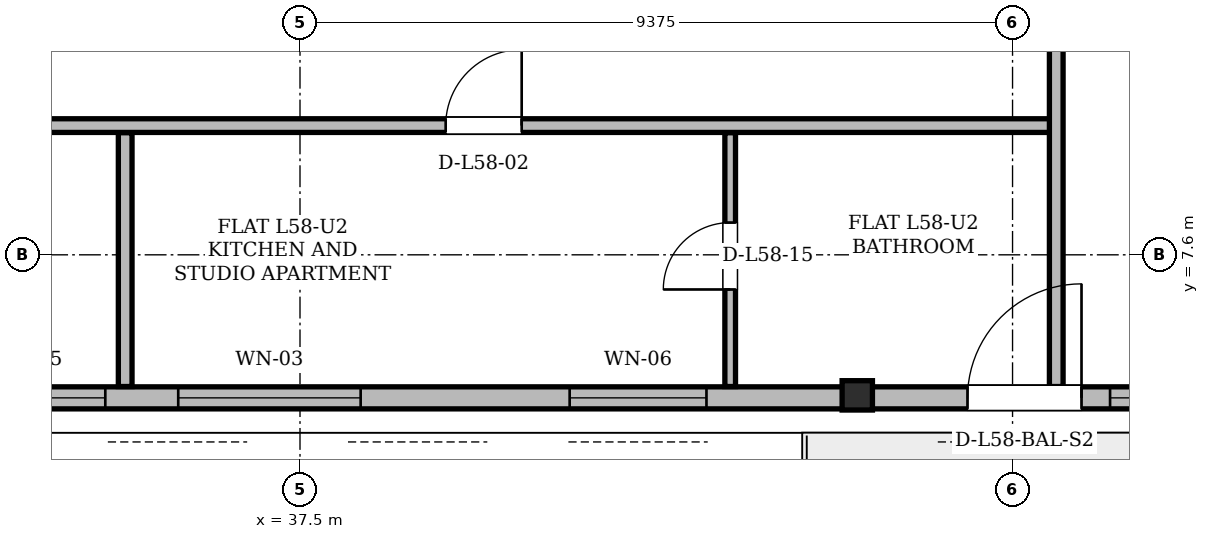
"""IFC4 building model, lengths in metres.
Left out: names, types, materials, properties, quantities, classifications, styles, units other than length and angle.
Written with IfcOpenShell. Run it as: python <this file> out.ifc"""

import sys

from ifc_helpers import new_model, si_unit, direction, frame, frame_2d, origin, origin_2d, place, context, subcontext, project, spatial, rectangle, i_section, extrude, element, fill, save


model = new_model("IFC4")
c1 = context("Model", 3, precision=1e-05, world=origin(), true_north=direction((0.0, 1.0)))
c2 = subcontext(c1, "Body", "Model", "MODEL_VIEW")
j1 = project(units=[si_unit("LENGTHUNIT", "METRE"), si_unit("PLANEANGLEUNIT", "RADIAN")], contexts=[c1])
p1 = place(None, origin())
s1 = spatial("IfcSite", under=j1, at=p1, CompositionType="ELEMENT")
p2 = place(p1, origin())
s2 = spatial("IfcBuilding", under=s1, at=p2, CompositionType="ELEMENT")
p3 = place(p2, frame((0.0, 0.0, 219.9)))
s3 = spatial("IfcBuildingStorey", under=s2, at=p3, CompositionType="ELEMENT", Elevation=219.9)
p4 = place(p3, frame((44.827, 5.718, 0.005), z_axis=(0.003058821819, 0.018352930912, 0.999826891785), x_axis=(-0.986393923832, 0.164398987305, 0.0)))
e1 = element("IfcColumn", 1, at=p4, inside=s3, PredefinedType="COLUMN", context=c2, shape_type="SweptSolid", body=[
    extrude(i_section(OverallWidth=0.399, OverallDepth=0.386, WebThickness=0.021, FlangeThickness=0.033, at=origin_2d()), origin(), (0.0, 0.0, 1.0), 3.592),
])
p5 = place(p3, frame((19.183, 5.718, 0.0), z_axis=(0.0, 0.0, 1.0), x_axis=(1.0, 0.0, 0.0)))
e2 = element("IfcWall", 2, at=p5, inside=s3, PredefinedType="SOLIDWALL", context=c2, shape_type="SweptSolid", body=[
    extrude(rectangle(XDim=36.634, YDim=0.29, at=frame_2d((18.317, 0.0))), origin(), (0.0, 0.0, 1.0), 2.677),
])
p6 = place(p5, frame((3.639, 0.0, 0.0)))
e3 = element("IfcOpeningElement", 3, at=p6, cuts=e2, PredefinedType="OPENING", context=c2, shape_type="SweptSolid", body=[
    extrude(rectangle(XDim=1.5, YDim=2.2, at=frame_2d((0.75, 1.1))), frame((0.0, 0.145, 0.0), z_axis=(0.0, -1.0, 0.0), x_axis=(1.0, 0.0, 0.0)), (0.0, 0.0, 1.0), 0.29),
])
p7 = place(p5, frame((27.099, 0.0, 0.0)))
e4 = element("IfcOpeningElement", 4, at=p7, cuts=e2, PredefinedType="OPENING", context=c2, shape_type="SweptSolid", body=[
    extrude(rectangle(XDim=1.5, YDim=2.2, at=frame_2d((0.75, 1.1))), frame((0.0, 0.145, 0.0), z_axis=(0.0, -1.0, 0.0), x_axis=(1.0, 0.0, 0.0)), (0.0, 0.0, 1.0), 0.29),
])
p8 = place(p5, frame((1.334, 0.0, 0.85)))
e5 = element("IfcOpeningElement", 5, at=p8, cuts=e2, PredefinedType="OPENING", context=c2, shape_type="SweptSolid", body=[
    extrude(rectangle(XDim=1.2, YDim=1.48, at=frame_2d((0.6, 0.74))), frame((0.0, 0.145, 0.0), z_axis=(0.0, -1.0, 0.0), x_axis=(1.0, 0.0, 0.0)), (0.0, 0.0, 1.0), 0.29),
])
p9 = place(p5, frame((7.323, 0.0, 0.85)))
e6 = element("IfcOpeningElement", 6, at=p9, cuts=e2, PredefinedType="OPENING", context=c2, shape_type="SweptSolid", body=[
    extrude(rectangle(XDim=2.2, YDim=1.717, at=frame_2d((1.1, 0.858))), frame((0.0, 0.145, 0.0), z_axis=(0.0, -1.0, 0.0), x_axis=(1.0, 0.0, 0.0)), (0.0, 0.0, 1.0), 0.29),
])
p10 = place(p5, frame((13.755, 0.0, 0.85)))
e7 = element("IfcOpeningElement", 7, at=p10, cuts=e2, PredefinedType="OPENING", context=c2, shape_type="SweptSolid", body=[
    extrude(rectangle(XDim=2.0, YDim=1.717, at=frame_2d((1.0, 0.858))), frame((0.0, 0.145, 0.0), z_axis=(0.0, -1.0, 0.0), x_axis=(1.0, 0.0, 0.0)), (0.0, 0.0, 1.0), 0.29),
])
p11 = place(p5, frame((16.715, 0.0, 0.85)))
e8 = element("IfcOpeningElement", 8, at=p11, cuts=e2, PredefinedType="OPENING", context=c2, shape_type="SweptSolid", body=[
    extrude(rectangle(XDim=2.4, YDim=1.717, at=frame_2d((1.2, 0.858))), frame((0.0, 0.145, 0.0), z_axis=(0.0, -1.0, 0.0), x_axis=(1.0, 0.0, 0.0)), (0.0, 0.0, 1.0), 0.29),
])
p12 = place(p5, frame((21.865, 0.0, 0.85)))
e9 = element("IfcOpeningElement", 9, at=p12, cuts=e2, PredefinedType="OPENING", context=c2, shape_type="SweptSolid", body=[
    extrude(rectangle(XDim=1.8, YDim=1.717, at=frame_2d((0.9, 0.858))), frame((0.0, 0.145, 0.0), z_axis=(0.0, -1.0, 0.0), x_axis=(1.0, 0.0, 0.0)), (0.0, 0.0, 1.0), 0.29),
])
p13 = place(p5, frame((28.975, 0.0, 0.85)))
e10 = element("IfcOpeningElement", 10, at=p13, cuts=e2, PredefinedType="OPENING", context=c2, shape_type="SweptSolid", body=[
    extrude(rectangle(XDim=1.2, YDim=1.48, at=frame_2d((0.6, 0.74))), frame((0.0, 0.145, 0.0), z_axis=(0.0, -1.0, 0.0), x_axis=(1.0, 0.0, 0.0)), (0.0, 0.0, 1.0), 0.29),
])
p14 = place(p5, frame((31.861, 0.0, 0.85)))
e11 = element("IfcOpeningElement", 11, at=p14, cuts=e2, PredefinedType="OPENING", context=c2, shape_type="SweptSolid", body=[
    extrude(rectangle(XDim=2.6, YDim=1.717, at=frame_2d((1.3, 0.858))), frame((0.0, 0.145, 0.0), z_axis=(0.0, -1.0, 0.0), x_axis=(1.0, 0.0, 0.0)), (0.0, 0.0, 1.0), 0.29),
])
p15 = place(p3, frame((25.6, 9.3, 0.0), z_axis=(0.0, 0.0, 1.0), x_axis=(1.0, 0.0, 0.0)))
e12 = element("IfcWall", 12, at=p15, inside=s3, PredefinedType="PARTITIONING", context=c2, shape_type="SweptSolid", body=[
    extrude(rectangle(XDim=21.85, YDim=0.18, at=frame_2d((10.925, 0.0))), origin(), (0.0, 0.0, 1.0), 2.913),
])
p16 = place(p15, frame((2.193, 0.0, 0.0)))
e13 = element("IfcOpeningElement", 13, at=p16, cuts=e12, PredefinedType="OPENING", context=c2, shape_type="SweptSolid", body=[
    extrude(rectangle(XDim=1.0, YDim=2.18, at=frame_2d((0.5, 1.09))), frame((0.0, 0.09, 0.0), z_axis=(0.0, -1.0, 0.0), x_axis=(1.0, 0.0, 0.0)), (0.0, 0.0, 1.0), 0.18),
])
p17 = place(p15, frame((13.817, 0.0, 0.0)))
e14 = element("IfcOpeningElement", 14, at=p17, cuts=e12, PredefinedType="OPENING", context=c2, shape_type="SweptSolid", body=[
    extrude(rectangle(XDim=1.0, YDim=2.18, at=frame_2d((0.5, 1.09))), frame((0.0, 0.09, 0.0), z_axis=(0.0, -1.0, 0.0), x_axis=(1.0, 0.0, 0.0)), (0.0, 0.0, 1.0), 0.18),
])
p18 = place(p3, frame((35.2, 5.867, 0.0), z_axis=(0.0, 0.0, 1.0), x_axis=(0.0, 1.0, 0.0)))
e15 = element("IfcWall", 15, at=p18, inside=s3, PredefinedType="PARTITIONING", context=c2, shape_type="SweptSolid", body=[
    extrude(rectangle(XDim=3.339, YDim=0.18, at=frame_2d((1.669, 0.0))), origin(), (0.0, 0.0, 1.0), 3.38),
])
p19 = place(p3, frame((43.16, 5.867, 0.0), z_axis=(0.0, 0.0, 1.0), x_axis=(0.0, 1.0, 0.0)))
e16 = element("IfcWall", 16, at=p19, inside=s3, PredefinedType="PARTITIONING", context=c2, shape_type="SweptSolid", body=[
    extrude(rectangle(XDim=3.339, YDim=0.14, at=frame_2d((1.669, 0.0))), origin(), (0.0, 0.0, 1.0), 3.38),
])
p20 = place(p19, frame((1.277, 0.0, 0.0)))
e17 = element("IfcOpeningElement", 17, at=p20, cuts=e16, PredefinedType="OPENING", context=c2, shape_type="SweptSolid", body=[
    extrude(rectangle(XDim=0.88, YDim=2.08, at=frame_2d((0.44, 1.04))), frame((0.0, 0.07, 0.0), z_axis=(0.0, -1.0, 0.0), x_axis=(1.0, 0.0, 0.0)), (0.0, 0.0, 1.0), 0.14),
])
p21 = place(p3, frame((47.45, 5.867, 0.0), z_axis=(0.0, 0.0, 1.0), x_axis=(0.0, 1.0, 0.0)))
e18 = element("IfcWall", 18, at=p21, inside=s3, PredefinedType="PARTITIONING", context=c2, shape_type="SweptSolid", body=[
    extrude(rectangle(XDim=25.465, YDim=0.18, at=frame_2d((12.732, 0.0))), origin(), (0.0, 0.0, 1.0), 2.913),
])
p22 = place(p21, frame((9.055, 0.0, 0.0)))
e19 = element("IfcOpeningElement", 19, at=p22, cuts=e18, PredefinedType="OPENING", context=c2, shape_type="SweptSolid", body=[
    extrude(rectangle(XDim=1.0, YDim=2.18, at=frame_2d((0.5, 1.09))), frame((0.0, 0.09, 0.0), z_axis=(0.0, -1.0, 0.0), x_axis=(1.0, 0.0, 0.0)), (0.0, 0.0, 1.0), 0.18),
])
p23 = place(p21, frame((15.845, 0.0, 0.0)))
e20 = element("IfcOpeningElement", 20, at=p23, cuts=e18, PredefinedType="OPENING", context=c2, shape_type="SweptSolid", body=[
    extrude(rectangle(XDim=1.0, YDim=2.18, at=frame_2d((0.5, 1.09))), frame((0.0, 0.09, 0.0), z_axis=(0.0, -1.0, 0.0), x_axis=(1.0, 0.0, 0.0)), (0.0, 0.0, 1.0), 0.18),
])
p24 = place(p7, origin())
e21 = element("IfcDoor", 21, at=p24, inside=s3, OperationType="SINGLE_SWING_RIGHT", PredefinedType="DOOR", context=c2, shape_type="SweptSolid", body=[
    extrude(rectangle(XDim=1.5, YDim=2.2, at=frame_2d((0.75, 1.1))), frame((0.0, 0.025, 0.0), z_axis=(0.0, -1.0, 0.0), x_axis=(1.0, 0.0, 0.0)), (0.0, 0.0, 1.0), 0.05),
])
fill(e4, e21)
p25 = place(p10, origin())
e22 = element("IfcWindow", 22, at=p25, inside=s3, PartitioningType="SINGLE_PANEL", PredefinedType="WINDOW", context=c2, shape_type="SweptSolid", body=[
    extrude(rectangle(XDim=2.0, YDim=1.717, at=frame_2d((1.0, 0.858))), frame((0.0, 0.03, 0.0), z_axis=(0.0, -1.0, 0.0), x_axis=(1.0, 0.0, 0.0)), (0.0, 0.0, 1.0), 0.06),
])
fill(e7, e22)
p26 = place(p11, origin())
e23 = element("IfcWindow", 23, at=p26, inside=s3, PartitioningType="SINGLE_PANEL", PredefinedType="WINDOW", context=c2, shape_type="SweptSolid", body=[
    extrude(rectangle(XDim=2.4, YDim=1.717, at=frame_2d((1.2, 0.858))), frame((0.0, 0.03, 0.0), z_axis=(0.0, -1.0, 0.0), x_axis=(1.0, 0.0, 0.0)), (0.0, 0.0, 1.0), 0.06),
])
fill(e8, e23)
p27 = place(p12, origin())
e24 = element("IfcWindow", 24, at=p27, inside=s3, PartitioningType="SINGLE_PANEL", PredefinedType="WINDOW", context=c2, shape_type="SweptSolid", body=[
    extrude(rectangle(XDim=1.8, YDim=1.717, at=frame_2d((0.9, 0.858))), frame((0.0, 0.03, 0.0), z_axis=(0.0, -1.0, 0.0), x_axis=(1.0, 0.0, 0.0)), (0.0, 0.0, 1.0), 0.06),
])
fill(e9, e24)
p28 = place(p13, origin())
e25 = element("IfcWindow", 25, at=p28, inside=s3, PartitioningType="SINGLE_PANEL", PredefinedType="WINDOW", context=c2, shape_type="SweptSolid", body=[
    extrude(rectangle(XDim=1.2, YDim=1.48, at=frame_2d((0.6, 0.74))), frame((0.0, 0.03, 0.0), z_axis=(0.0, -1.0, 0.0), x_axis=(1.0, 0.0, 0.0)), (0.0, 0.0, 1.0), 0.06),
])
fill(e10, e25)
p29 = place(p17, origin())
e26 = element("IfcDoor", 26, at=p29, inside=s3, OperationType="SINGLE_SWING_RIGHT", PredefinedType="DOOR", context=c2, shape_type="SweptSolid", body=[
    extrude(rectangle(XDim=1.0, YDim=2.18, at=frame_2d((0.5, 1.09))), frame((0.0, 0.025, 0.0), z_axis=(0.0, -1.0, 0.0), x_axis=(1.0, 0.0, 0.0)), (0.0, 0.0, 1.0), 0.05),
])
fill(e14, e26)
p30 = place(p20, origin())
e27 = element("IfcDoor", 27, at=p30, inside=s3, OperationType="SINGLE_SWING_LEFT", PredefinedType="DOOR", context=c2, shape_type="SweptSolid", body=[
    extrude(rectangle(XDim=0.88, YDim=2.08, at=frame_2d((0.44, 1.04))), frame((0.0, 0.025, 0.0), z_axis=(0.0, -1.0, 0.0), x_axis=(1.0, 0.0, 0.0)), (0.0, 0.0, 1.0), 0.05),
])
fill(e17, e27)
save(model, sys.argv[1])
